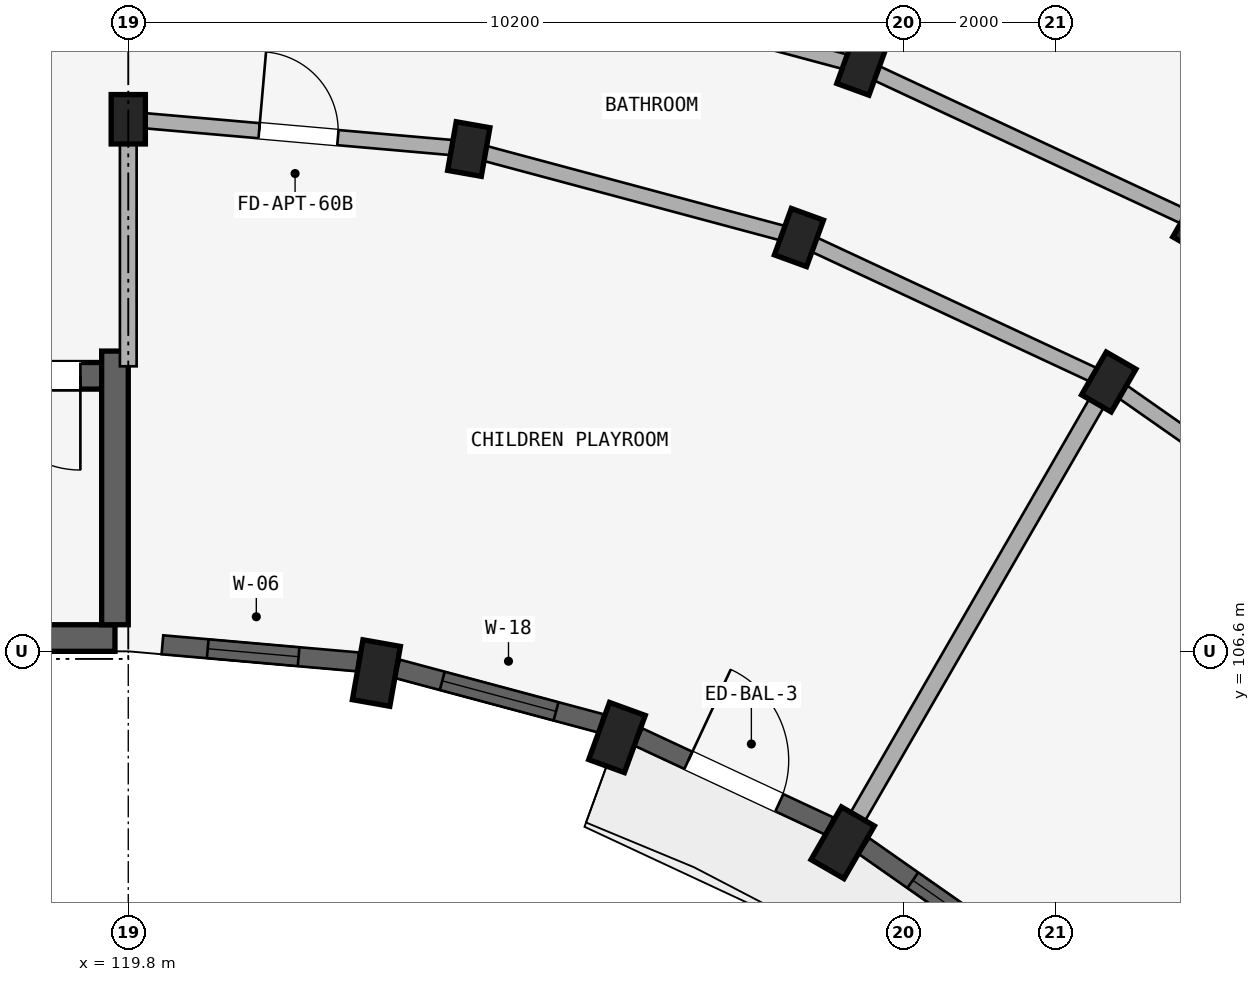
"""IFC4 building model, lengths in metres.
Left out: names, types, materials, properties, quantities, classifications, styles, units other than length and angle.
Written with IfcOpenShell. Run it as: python <this file> out.ifc"""

import sys

from ifc_helpers import new_model, si_unit, direction, frame, frame_2d, origin, origin_2d, place, context, subcontext, project, spatial, rectangle, extrude, element, fill, save


model = new_model("IFC4")
c1 = context("Model", 3, precision=1e-05, world=origin(), true_north=direction((0.0, 1.0)))
c2 = subcontext(c1, "Body", "Model", "MODEL_VIEW")
j1 = project(units=[si_unit("LENGTHUNIT", "METRE"), si_unit("PLANEANGLEUNIT", "RADIAN")], contexts=[c1])
p1 = place(None, origin())
s1 = spatial("IfcSite", under=j1, at=p1, CompositionType="ELEMENT")
p2 = place(p1, origin())
s2 = spatial("IfcBuilding", under=s1, at=p2, CompositionType="ELEMENT")
p3 = place(p2, frame((0.0, 0.0, 27.6)))
s3 = spatial("IfcBuildingStorey", under=s2, at=p3, CompositionType="ELEMENT", Elevation=27.6)
p4 = place(p3, frame((119.625, 106.775, 0.0), z_axis=(0.0, 0.0, 1.0), x_axis=(-1.0, 0.0, 0.0)))
e1 = element("IfcWall", 1, at=p4, inside=s3, PredefinedType="SHEAR", context=c2, shape_type="SweptSolid", body=[
    extrude(rectangle(XDim=8.25, YDim=0.35, at=frame_2d((4.125, 0.0))), origin(), (0.0, 0.0, 1.0), 2.93),
])
p5 = place(p3, frame((119.45, 110.225, 0.0), z_axis=(0.0, 0.0, 1.0), x_axis=(-1.0, 0.0, 0.0)))
e2 = element("IfcWall", 2, at=p5, inside=s3, PredefinedType="SHEAR", context=c2, shape_type="SweptSolid", body=[
    extrude(rectangle(XDim=7.9, YDim=0.35, at=frame_2d((3.95, 0.0))), origin(), (0.0, 0.0, 1.0), 2.93),
])
p6 = place(p5, frame((0.28, 0.0, 0.0)))
e3 = element("IfcOpeningElement", 3, at=p6, cuts=e2, PredefinedType="OPENING", context=c2, shape_type="SweptSolid", body=[
    extrude(rectangle(XDim=1.24, YDim=2.15, at=frame_2d((0.62, 1.075))), frame((0.0, 0.185, 0.0), z_axis=(0.0, -1.0, 0.0), x_axis=(1.0, 0.0, 0.0)), (0.0, 0.0, 1.0), 0.37),
])
p7 = place(p3, frame((119.625, 106.95, 0.0), z_axis=(0.0, 0.0, 1.0), x_axis=(0.0, 1.0, 0.0)))
e4 = element("IfcWall", 4, at=p7, inside=s3, PredefinedType="SHEAR", context=c2, shape_type="SweptSolid", body=[
    extrude(rectangle(XDim=3.6, YDim=0.35, at=frame_2d((1.8, 0.0))), origin(), (0.0, 0.0, 1.0), 2.93),
])
p8 = place(p3, frame((119.8, 113.6, 0.0), z_axis=(0.0, 0.0, 1.0), x_axis=(1.0, 0.0, 0.0)))
e5 = element("IfcColumn", 5, at=p8, inside=s3, PredefinedType="COLUMN", context=c2, shape_type="SweptSolid", body=[
    extrude(rectangle(XDim=0.45, YDim=0.65, at=origin_2d()), origin(), (0.0, 0.0, 1.0), 2.93),
])
p9 = place(p3, frame((123.065, 106.314, 0.0), z_axis=(0.0, 0.0, 1.0), x_axis=(-0.984807753012, 0.173648177667, 0.0)))
e6 = element("IfcColumn", 6, at=p9, inside=s3, PredefinedType="COLUMN", context=c2, shape_type="SweptSolid", body=[
    extrude(rectangle(XDim=0.5, YDim=0.8, at=origin_2d()), origin(), (0.0, 0.0, 1.0), 2.93),
])
p10 = place(p3, frame((124.28, 113.208, 0.0), z_axis=(0.0, 0.0, 1.0), x_axis=(-0.984807753012, 0.173648177667, 0.0)))
e7 = element("IfcColumn", 7, at=p10, inside=s3, PredefinedType="COLUMN", context=c2, shape_type="SweptSolid", body=[
    extrude(rectangle(XDim=0.45, YDim=0.65, at=origin_2d()), origin(), (0.0, 0.0, 1.0), 2.93),
])
p11 = place(p3, frame((126.23, 105.466, 0.0), z_axis=(0.0, 0.0, 1.0), x_axis=(-0.939692620786, 0.342020143326, 0.0)))
e8 = element("IfcColumn", 8, at=p11, inside=s3, PredefinedType="COLUMN", context=c2, shape_type="SweptSolid", body=[
    extrude(rectangle(XDim=0.5, YDim=0.8, at=origin_2d()), origin(), (0.0, 0.0, 1.0), 2.93),
])
for number, where, z_axis, x_axis in (
    (9, (128.624, 112.044, 0.0), (0.0, 0.0, 1.0), (-0.94, 0.342, 0.0)),
    (10, (129.445, 114.299, 0.0), (0.0, 0.0, 1.0), (-0.94, 0.342, 0.0)),
):
    element("IfcColumn", number, at=place(p3, frame(where, z_axis=z_axis, x_axis=x_axis)), inside=s3, PredefinedType="COLUMN", context=c2, shape_type="SweptSolid", body=[
        extrude(rectangle(XDim=0.45, YDim=0.65, at=origin_2d()), origin(), (0.0, 0.0, 1.0), 2.93),
    ])
p12 = place(p3, frame((129.2, 104.081, 0.0), z_axis=(0.0, 0.0, 1.0), x_axis=(-0.866025403784, 0.5, 0.0)))
e11 = element("IfcColumn", 11, at=p12, inside=s3, PredefinedType="COLUMN", context=c2, shape_type="SweptSolid", body=[
    extrude(rectangle(XDim=0.5, YDim=0.8, at=origin_2d()), origin(), (0.0, 0.0, 1.0), 2.93),
])
for number, where, z_axis, x_axis in (
    (12, (132.7, 110.144, 0.0), (0.0, 0.0, 1.0), (-0.866, 0.5, 0.0)),
    (13, (133.9, 112.222, 0.0), (0.0, 0.0, 1.0), (-0.866, 0.5, 0.0)),
):
    element("IfcColumn", number, at=place(p3, frame(where, z_axis=z_axis, x_axis=x_axis)), inside=s3, PredefinedType="COLUMN", context=c2, shape_type="SweptSolid", body=[
        extrude(rectangle(XDim=0.45, YDim=0.65, at=origin_2d()), origin(), (0.0, 0.0, 1.0), 2.93),
    ])
p13 = place(p3, frame((119.8, 113.6, 0.0), z_axis=(0.0, 0.0, 1.0), x_axis=(0.996191949488, -0.087187153726, 0.0)))
e14 = element("IfcWall", 14, at=p13, inside=s3, PredefinedType="STANDARD", context=c2, shape_type="SweptSolid", body=[
    extrude(rectangle(XDim=4.497, YDim=0.2, at=frame_2d((2.249, 0.0))), origin(), (0.0, 0.0, 1.0), 2.372),
])
p14 = place(p13, frame((1.729, 0.0, 0.0)))
e15 = element("IfcOpeningElement", 15, at=p14, cuts=e14, PredefinedType="OPENING", context=c2, shape_type="SweptSolid", body=[
    extrude(rectangle(XDim=1.04, YDim=2.15, at=frame_2d((0.52, 1.075))), frame((0.0, 0.11, 0.0), z_axis=(0.0, -1.0, 0.0), x_axis=(1.0, 0.0, 0.0)), (0.0, 0.0, 1.0), 0.22),
])
p15 = place(p3, frame((124.28, 113.208, 0.0), z_axis=(0.0, 0.0, 1.0), x_axis=(0.965934240054, -0.258787642463, 0.0)))
e16 = element("IfcWall", 16, at=p15, inside=s3, PredefinedType="STANDARD", context=c2, shape_type="SweptSolid", body=[
    extrude(rectangle(XDim=4.497, YDim=0.2, at=frame_2d((2.249, 0.0))), origin(), (0.0, 0.0, 1.0), 2.372),
])
p16 = place(p3, frame((124.697, 115.572, 0.0), z_axis=(0.0, 0.0, 1.0), x_axis=(0.965930095386, -0.258803112091, 0.0)))
e17 = element("IfcWall", 17, at=p16, inside=s3, PredefinedType="STANDARD", context=c2, shape_type="SweptSolid", body=[
    extrude(rectangle(XDim=4.916, YDim=0.2, at=frame_2d((2.458, 0.0))), origin(), (0.0, 0.0, 1.0), 2.372),
])
p17 = place(p3, frame((128.624, 112.044, 0.0), z_axis=(0.0, 0.0, 1.0), x_axis=(0.906307919131, -0.422617978463, 0.0)))
e18 = element("IfcWall", 18, at=p17, inside=s3, PredefinedType="STANDARD", context=c2, shape_type="SweptSolid", body=[
    extrude(rectangle(XDim=4.497, YDim=0.2, at=frame_2d((2.249, 0.0))), origin(), (0.0, 0.0, 1.0), 2.372),
])
p18 = place(p3, frame((129.445, 114.299, 0.0), z_axis=(0.0, 0.0, 1.0), x_axis=(0.906302381024, -0.422629854778, 0.0)))
e19 = element("IfcWall", 19, at=p18, inside=s3, PredefinedType="STANDARD", context=c2, shape_type="SweptSolid", body=[
    extrude(rectangle(XDim=4.915, YDim=0.2, at=frame_2d((2.458, 0.0))), origin(), (0.0, 0.0, 1.0), 2.372),
])
p19 = place(p3, frame((132.7, 110.144, 0.0), z_axis=(0.0, 0.0, 1.0), x_axis=(0.819155404658, -0.573571637217, 0.0)))
e20 = element("IfcWall", 20, at=p19, inside=s3, PredefinedType="STANDARD", context=c2, shape_type="SweptSolid", body=[
    extrude(rectangle(XDim=4.497, YDim=0.2, at=frame_2d((2.249, 0.0))), origin(), (0.0, 0.0, 1.0), 2.372),
])
p20 = place(p19, frame((1.709, 0.0, 0.0)))
e21 = element("IfcOpeningElement", 21, at=p20, cuts=e20, PredefinedType="OPENING", context=c2, shape_type="SweptSolid", body=[
    extrude(rectangle(XDim=1.08, YDim=2.15, at=frame_2d((0.54, 1.075))), frame((0.0, 0.11, 0.0), z_axis=(0.0, -1.0, 0.0), x_axis=(1.0, 0.0, 0.0)), (0.0, 0.0, 1.0), 0.22),
])
p21 = place(p3, frame((119.8, 110.35, 0.0), z_axis=(0.0, 0.0, 1.0), x_axis=(0.0, 1.0, 0.0)))
e22 = element("IfcWall", 22, at=p21, inside=s3, PredefinedType="STANDARD", context=c2, shape_type="SweptSolid", body=[
    extrude(rectangle(XDim=3.2, YDim=0.22, at=frame_2d((1.6, 0.0))), origin(), (0.0, 0.0, 1.0), 2.372),
])
p22 = place(p3, frame((129.479, 114.393, 0.0), z_axis=(0.0, 0.0, 1.0), x_axis=(0.342022120477, 0.939691901159, 0.0)))
e23 = element("IfcWall", 23, at=p22, inside=s3, PredefinedType="PARTITIONING", context=c2, shape_type="SweptSolid", body=[
    extrude(rectangle(XDim=17.42, YDim=0.15, at=frame_2d((8.71, 0.0))), origin(), (0.0, 0.0, 1.0), 2.372),
])
p23 = place(p22, frame((4.45, 0.0, 0.0)))
e24 = element("IfcOpeningElement", 24, at=p23, cuts=e23, PredefinedType="OPENING", context=c2, shape_type="SweptSolid", body=[
    extrude(rectangle(XDim=0.8, YDim=2.1, at=frame_2d((0.4, 1.05))), frame((0.0, 0.085, 0.0), z_axis=(0.0, -1.0, 0.0), x_axis=(1.0, 0.0, 0.0)), (0.0, 0.0, 1.0), 0.17),
])
p24 = place(p3, frame((129.3, 104.254, 0.0), z_axis=(0.0, 0.0, 1.0), x_axis=(0.499997969693, 0.866026575979, 0.0)))
e25 = element("IfcWall", 25, at=p24, inside=s3, PredefinedType="STANDARD", context=c2, shape_type="SweptSolid", body=[
    extrude(rectangle(XDim=6.75, YDim=0.22, at=frame_2d((3.375, 0.0))), origin(), (0.0, 0.0, 1.0), 2.372),
])
p25 = place(p3, frame((120.249, 106.686, 0.0), z_axis=(0.0, 0.0, 1.0), x_axis=(0.996188278786, -0.087229084652, 0.0)))
e26 = element("IfcWall", 26, at=p25, inside=s3, PredefinedType="STANDARD", context=c2, shape_type="SweptSolid", body=[
    extrude(rectangle(XDim=2.583, YDim=0.25, at=frame_2d((1.292, 0.0))), origin(), (0.0, 0.0, 1.0), 2.472),
])
p26 = place(p25, frame((0.599, 0.0, 0.772)))
e27 = element("IfcOpeningElement", 27, at=p26, cuts=e26, PredefinedType="OPENING", context=c2, shape_type="SweptSolid", body=[
    extrude(rectangle(XDim=1.2, YDim=1.5, at=frame_2d((0.6, 0.75))), frame((0.0, 0.135, 0.0), z_axis=(0.0, -1.0, 0.0), x_axis=(1.0, 0.0, 0.0)), (0.0, 0.0, 1.0), 0.27),
])
p27 = place(p3, frame((123.342, 106.369, 0.0), z_axis=(0.0, 0.0, 1.0), x_axis=(0.965935855992, -0.25878161084, 0.0)))
e28 = element("IfcWall", 28, at=p27, inside=s3, PredefinedType="STANDARD", context=c2, shape_type="SweptSolid", body=[
    extrude(rectangle(XDim=2.77, YDim=0.25, at=frame_2d((1.385, 0.0))), origin(), (0.0, 0.0, 1.0), 2.472),
])
p28 = place(p27, frame((0.61, 0.0, 0.672)))
e29 = element("IfcOpeningElement", 29, at=p28, cuts=e28, PredefinedType="OPENING", context=c2, shape_type="SweptSolid", body=[
    extrude(rectangle(XDim=1.55, YDim=1.6, at=frame_2d((0.775, 0.8))), frame((0.0, 0.135, 0.0), z_axis=(0.0, -1.0, 0.0), x_axis=(1.0, 0.0, 0.0)), (0.0, 0.0, 1.0), 0.27),
])
p29 = place(p3, frame((126.513, 105.472, 0.0), z_axis=(0.0, 0.0, 1.0), x_axis=(0.906293449611, -0.422649007088, 0.0)))
e30 = element("IfcWall", 30, at=p29, inside=s3, PredefinedType="STANDARD", context=c2, shape_type="SweptSolid", body=[
    extrude(rectangle(XDim=2.77, YDim=0.25, at=frame_2d((1.385, 0.0))), origin(), (0.0, 0.0, 1.0), 2.472),
])
p30 = place(p29, frame((0.725, 0.0, 0.0)))
e31 = element("IfcOpeningElement", 31, at=p30, cuts=e30, PredefinedType="OPENING", context=c2, shape_type="SweptSolid", body=[
    extrude(rectangle(XDim=1.32, YDim=2.15, at=frame_2d((0.66, 1.075))), frame((0.0, 0.135, 0.0), z_axis=(0.0, -1.0, 0.0), x_axis=(1.0, 0.0, 0.0)), (0.0, 0.0, 1.0), 0.27),
])
p31 = place(p3, frame((129.479, 104.038, 0.0), z_axis=(0.0, 0.0, 1.0), x_axis=(0.819111815273, -0.573633885053, 0.0)))
e32 = element("IfcWall", 32, at=p31, inside=s3, PredefinedType="STANDARD", context=c2, shape_type="SweptSolid", body=[
    extrude(rectangle(XDim=2.77, YDim=0.25, at=frame_2d((1.385, 0.0))), origin(), (0.0, 0.0, 1.0), 2.472),
])
p32 = place(p31, frame((0.785, 0.0, 0.772)))
e33 = element("IfcOpeningElement", 33, at=p32, cuts=e32, PredefinedType="OPENING", context=c2, shape_type="SweptSolid", body=[
    extrude(rectangle(XDim=1.2, YDim=1.5, at=frame_2d((0.6, 0.75))), frame((0.0, 0.135, 0.0), z_axis=(0.0, -1.0, 0.0), x_axis=(1.0, 0.0, 0.0)), (0.0, 0.0, 1.0), 0.27),
])
p33 = place(p26, origin())
e34 = element("IfcWindow", 34, at=p33, inside=s3, PartitioningType="SINGLE_PANEL", PredefinedType="WINDOW", context=c2, shape_type="SweptSolid", body=[
    extrude(rectangle(XDim=1.2, YDim=1.5, at=frame_2d((0.6, 0.75))), frame((0.0, 0.03, 0.0), z_axis=(0.0, -1.0, 0.0), x_axis=(1.0, 0.0, 0.0)), (0.0, 0.0, 1.0), 0.06),
])
fill(e27, e34)
p34 = place(p28, origin())
e35 = element("IfcWindow", 35, at=p34, inside=s3, PartitioningType="DOUBLE_PANEL_VERTICAL", PredefinedType="WINDOW", context=c2, shape_type="SweptSolid", body=[
    extrude(rectangle(XDim=1.55, YDim=1.6, at=frame_2d((0.775, 0.8))), frame((0.0, 0.03, 0.0), z_axis=(0.0, -1.0, 0.0), x_axis=(1.0, 0.0, 0.0)), (0.0, 0.0, 1.0), 0.06),
])
fill(e29, e35)
p35 = place(p32, origin())
e36 = element("IfcWindow", 36, at=p35, inside=s3, PartitioningType="SINGLE_PANEL", PredefinedType="WINDOW", context=c2, shape_type="SweptSolid", body=[
    extrude(rectangle(XDim=1.2, YDim=1.5, at=frame_2d((0.6, 0.75))), frame((0.0, 0.03, 0.0), z_axis=(0.0, -1.0, 0.0), x_axis=(1.0, 0.0, 0.0)), (0.0, 0.0, 1.0), 0.06),
])
fill(e33, e36)
p36 = place(p6, origin())
e37 = element("IfcDoor", 37, at=p36, inside=s3, OperationType="SINGLE_SWING_LEFT", PredefinedType="DOOR", context=c2, shape_type="SweptSolid", body=[
    extrude(rectangle(XDim=1.24, YDim=2.15, at=frame_2d((0.62, 1.075))), frame((0.0, 0.025, 0.0), z_axis=(0.0, -1.0, 0.0), x_axis=(1.0, 0.0, 0.0)), (0.0, 0.0, 1.0), 0.05),
])
fill(e3, e37)
p37 = place(p14, origin())
e38 = element("IfcDoor", 38, at=p37, inside=s3, OperationType="SINGLE_SWING_LEFT", PredefinedType="DOOR", context=c2, shape_type="SweptSolid", body=[
    extrude(rectangle(XDim=1.04, YDim=2.15, at=frame_2d((0.52, 1.075))), frame((0.0, 0.025, 0.0), z_axis=(0.0, -1.0, 0.0), x_axis=(1.0, 0.0, 0.0)), (0.0, 0.0, 1.0), 0.05),
])
fill(e15, e38)
p38 = place(p30, frame((1.32, 0.0, 0.0), z_axis=(0.0, 0.0, 1.0), x_axis=(-1.0, 0.0, 0.0)))
e39 = element("IfcDoor", 39, at=p38, inside=s3, OperationType="SINGLE_SWING_RIGHT", PredefinedType="DOOR", context=c2, shape_type="SweptSolid", body=[
    extrude(rectangle(XDim=1.32, YDim=2.15, at=frame_2d((0.66, 1.075))), frame((0.0, 0.025, 0.0), z_axis=(0.0, -1.0, 0.0), x_axis=(1.0, 0.0, 0.0)), (0.0, 0.0, 1.0), 0.05),
])
fill(e31, e39)
save(model, sys.argv[1])
